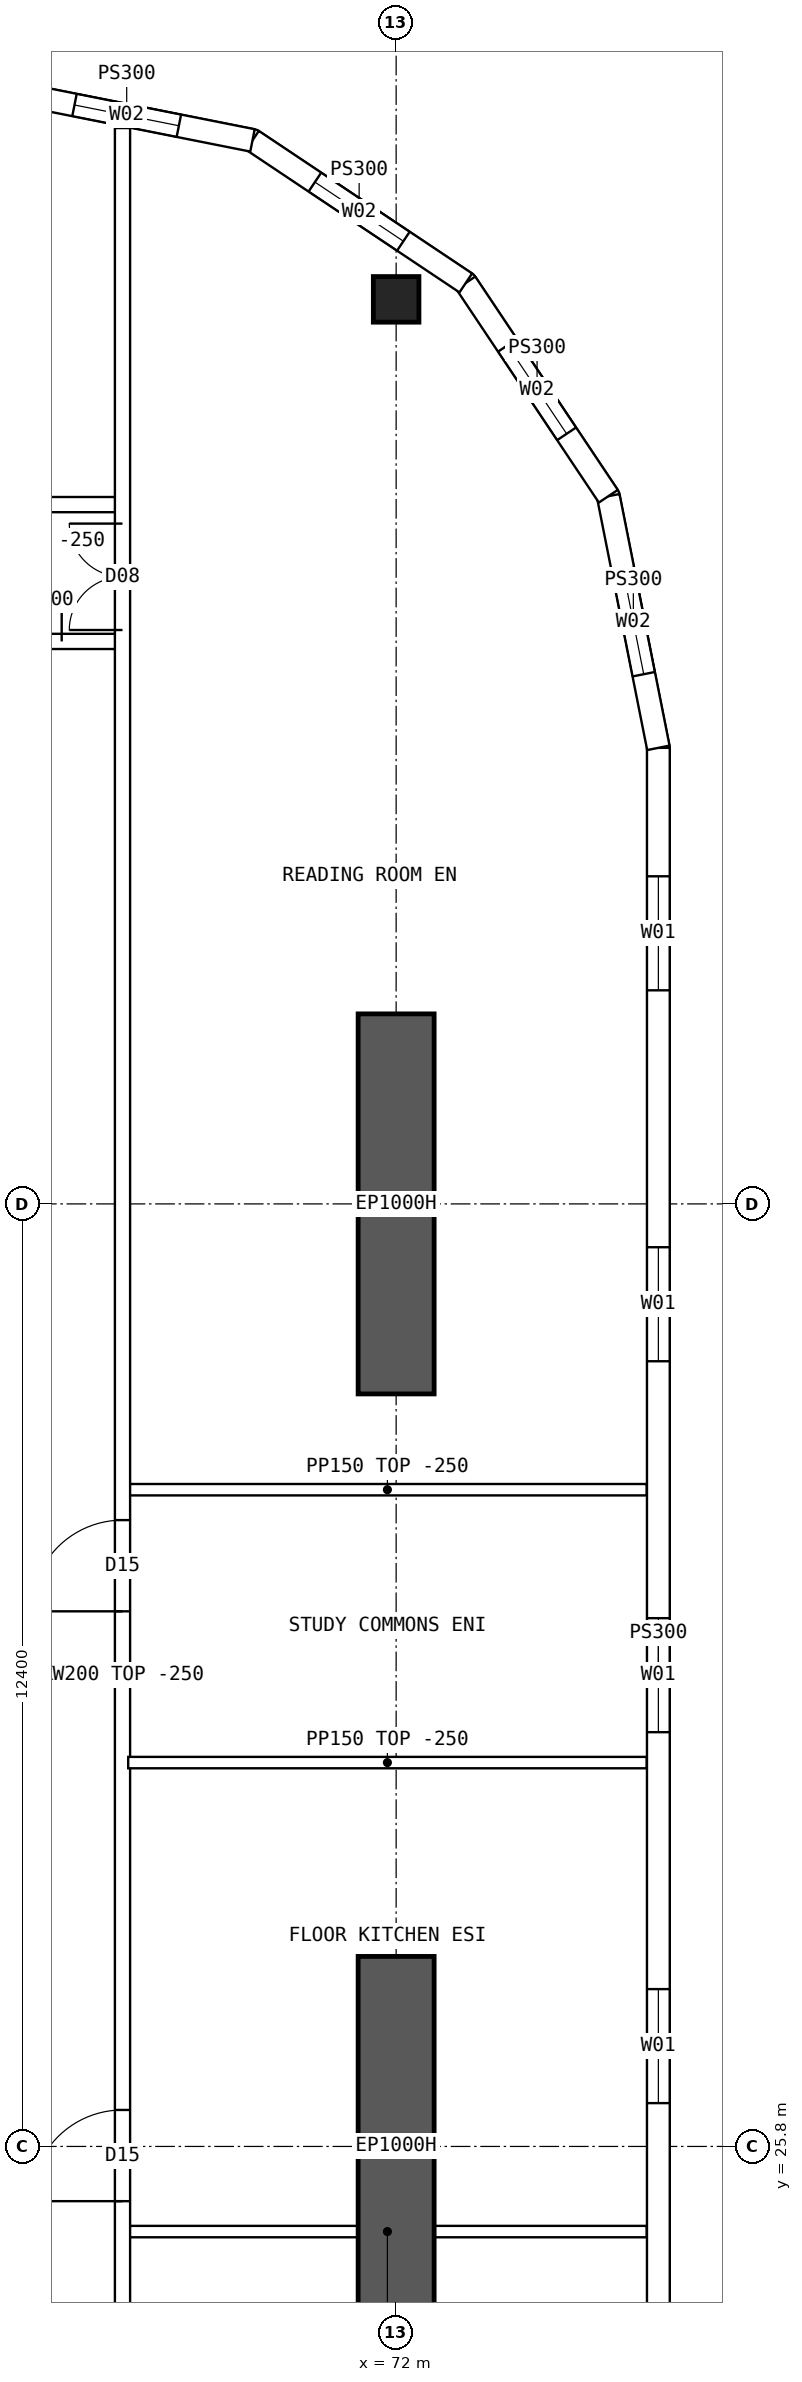
"""IFC4 building model, lengths in metres.
Left out: names, types, materials, properties, quantities, classifications, styles, units other than length and angle.
Written with IfcOpenShell. Run it as: python <this file> out.ifc"""

import sys

from ifc_helpers import new_model, si_unit, direction, frame, frame_2d, origin, origin_2d, place, context, subcontext, project, spatial, polyline, rectangle, hollow_rectangle, outline, extrude, element, fill, save


model = new_model("IFC4")
c1 = context("Model", 3, precision=1e-05, world=origin(), true_north=direction((0.0, 1.0)))
c2 = subcontext(c1, "Body", "Model", "MODEL_VIEW")
j1 = project(units=[si_unit("LENGTHUNIT", "METRE"), si_unit("PLANEANGLEUNIT", "RADIAN")], contexts=[c1])
p1 = place(None, origin())
s1 = spatial("IfcSite", under=j1, at=p1, CompositionType="ELEMENT")
p2 = place(p1, origin())
s2 = spatial("IfcBuilding", under=s1, at=p2, CompositionType="ELEMENT")
p3 = place(p2, frame((0.0, 0.0, 231.55)))
s3 = spatial("IfcBuildingStorey", under=s2, at=p3, CompositionType="ELEMENT", Elevation=231.55)
p4 = place(p3, frame((72.0, 50.1, 0.0), z_axis=(0.0, 0.0, 1.0), x_axis=(1.0, 0.0, 0.0)))
e1 = element("IfcColumn", 1, at=p4, inside=s3, PredefinedType="COLUMN", context=c2, shape_type="SweptSolid", body=[
    extrude(hollow_rectangle(XDim=0.6, YDim=0.6, WallThickness=0.06, at=origin_2d()), origin(), (0.0, 0.0, 1.0), 3.75),
])
for number, where, z_axis, x_axis in (
    (2, (72.0, 23.3, 0.0), (0.0, 0.0, 1.0), (0.0, 1.0, 0.0)),
    (3, (72.0, 35.7, 0.0), (0.0, 0.0, 1.0), (0.0, 1.0, 0.0)),
):
    element("IfcWall", number, at=place(p3, frame(where, z_axis=z_axis, x_axis=x_axis)), inside=s3, PredefinedType="SHEAR", context=c2, shape_type="SweptSolid", body=[
        extrude(rectangle(XDim=5.0, YDim=1.0, at=frame_2d((2.5, 0.0))), origin(), (0.0, 0.0, 1.0), 3.75),
    ])
p5 = place(p3, frame((75.45, 19.8, 0.0), z_axis=(0.0, 0.0, 1.0), x_axis=(0.0, 1.0, 0.0)))
e4 = element("IfcWall", 4, at=p5, inside=s3, PredefinedType="SOLIDWALL", context=c2, shape_type="SweptSolid", body=[
    extrude(outline(polyline([(-0.015, -0.15), (24.415, -0.15), (24.385, 0.15), (0.015, 0.15), (-0.015, -0.15)])), origin(), (0.0, 0.0, 1.0), 3.5),
])
p6 = place(p5, frame((1.69, 0.0, 0.9)))
e5 = element("IfcOpeningElement", 5, at=p6, cuts=e4, PredefinedType="OPENING", context=c2, shape_type="SweptSolid", body=[
    extrude(rectangle(XDim=1.5, YDim=2.0, at=frame_2d((0.75, 1.0))), frame((0.0, 0.16, 0.0), z_axis=(0.0, -1.0, 0.0), x_axis=(1.0, 0.0, 0.0)), (0.0, 0.0, 1.0), 0.32),
])
p7 = place(p5, frame((6.57, 0.0, 0.9)))
e6 = element("IfcOpeningElement", 6, at=p7, cuts=e4, PredefinedType="OPENING", context=c2, shape_type="SweptSolid", body=[
    extrude(rectangle(XDim=1.5, YDim=2.0, at=frame_2d((0.75, 1.0))), frame((0.0, 0.16, 0.0), z_axis=(0.0, -1.0, 0.0), x_axis=(1.0, 0.0, 0.0)), (0.0, 0.0, 1.0), 0.32),
])
p8 = place(p5, frame((11.45, 0.0, 0.9)))
e7 = element("IfcOpeningElement", 7, at=p8, cuts=e4, PredefinedType="OPENING", context=c2, shape_type="SweptSolid", body=[
    extrude(rectangle(XDim=1.5, YDim=2.0, at=frame_2d((0.75, 1.0))), frame((0.0, 0.16, 0.0), z_axis=(0.0, -1.0, 0.0), x_axis=(1.0, 0.0, 0.0)), (0.0, 0.0, 1.0), 0.32),
])
p9 = place(p5, frame((16.33, 0.0, 0.9)))
e8 = element("IfcOpeningElement", 8, at=p9, cuts=e4, PredefinedType="OPENING", context=c2, shape_type="SweptSolid", body=[
    extrude(rectangle(XDim=1.5, YDim=2.0, at=frame_2d((0.75, 1.0))), frame((0.0, 0.16, 0.0), z_axis=(0.0, -1.0, 0.0), x_axis=(1.0, 0.0, 0.0)), (0.0, 0.0, 1.0), 0.32),
])
p10 = place(p5, frame((21.21, 0.0, 0.9)))
e9 = element("IfcOpeningElement", 9, at=p10, cuts=e4, PredefinedType="OPENING", context=c2, shape_type="SweptSolid", body=[
    extrude(rectangle(XDim=1.5, YDim=2.0, at=frame_2d((0.75, 1.0))), frame((0.0, 0.16, 0.0), z_axis=(0.0, -1.0, 0.0), x_axis=(1.0, 0.0, 0.0)), (0.0, 0.0, 1.0), 0.32),
])
p11 = place(p3, frame((75.45, 44.2, 0.0), z_axis=(0.0, 0.0, 1.0), x_axis=(-0.19508664885, 0.980786011034, 0.0)))
e10 = element("IfcWall", 10, at=p11, inside=s3, PredefinedType="SOLIDWALL", context=c2, shape_type="SweptSolid", body=[
    extrude(outline(polyline([(-0.015, -0.15), (3.405, -0.15), (3.345, 0.15), (0.015, 0.15), (-0.015, -0.15)])), origin(), (0.0, 0.0, 1.0), 3.5),
])
p12 = place(p11, frame((0.988, 0.0, 0.9)))
e11 = element("IfcOpeningElement", 11, at=p12, cuts=e10, PredefinedType="OPENING", context=c2, shape_type="SweptSolid", body=[
    extrude(rectangle(XDim=1.4, YDim=1.8, at=frame_2d((0.7, 0.9))), frame((0.0, 0.16, 0.0), z_axis=(0.0, -1.0, 0.0), x_axis=(1.0, 0.0, 0.0)), (0.0, 0.0, 1.0), 0.32),
])
p13 = place(p3, frame((74.792, 47.51, 0.0), z_axis=(0.0, 0.0, 1.0), x_axis=(-0.555567969291, 0.831471124873, 0.0)))
e12 = element("IfcWall", 12, at=p13, inside=s3, PredefinedType="SOLIDWALL", context=c2, shape_type="SweptSolid", body=[
    extrude(outline(polyline([(-0.03, -0.15), (3.405, -0.15), (3.345, 0.15), (0.03, 0.15), (-0.03, -0.15)])), origin(), (0.0, 0.0, 1.0), 3.5),
])
p14 = place(p13, frame((0.988, 0.0, 0.9)))
e13 = element("IfcOpeningElement", 13, at=p14, cuts=e12, PredefinedType="OPENING", context=c2, shape_type="SweptSolid", body=[
    extrude(rectangle(XDim=1.4, YDim=1.8, at=frame_2d((0.7, 0.9))), frame((0.0, 0.16, 0.0), z_axis=(0.0, -1.0, 0.0), x_axis=(1.0, 0.0, 0.0)), (0.0, 0.0, 1.0), 0.32),
])
p15 = place(p3, frame((72.917, 50.316, 0.0), z_axis=(0.0, 0.0, 1.0), x_axis=(-0.831460037396, 0.555584562613, 0.0)))
e14 = element("IfcWall", 14, at=p15, inside=s3, PredefinedType="SOLIDWALL", context=c2, shape_type="SweptSolid", body=[
    extrude(outline(polyline([(-0.03, -0.15), (3.405, -0.15), (3.345, 0.15), (0.03, 0.15), (-0.03, -0.15)])), origin(), (0.0, 0.0, 1.0), 3.5),
])
p16 = place(p15, frame((0.988, 0.0, 0.9)))
e15 = element("IfcOpeningElement", 15, at=p16, cuts=e14, PredefinedType="OPENING", context=c2, shape_type="SweptSolid", body=[
    extrude(rectangle(XDim=1.4, YDim=1.8, at=frame_2d((0.7, 0.9))), frame((0.0, 0.16, 0.0), z_axis=(0.0, -1.0, 0.0), x_axis=(1.0, 0.0, 0.0)), (0.0, 0.0, 1.0), 0.32),
])
p17 = place(p3, frame((70.11, 52.192, 0.0), z_axis=(0.0, 0.0, 1.0), x_axis=(-0.98078325777, 0.195100490205, 0.0)))
e16 = element("IfcWall", 16, at=p17, inside=s3, PredefinedType="SOLIDWALL", context=c2, shape_type="SweptSolid", body=[
    extrude(outline(polyline([(-0.03, -0.15), (3.405, -0.15), (3.345, 0.15), (0.03, 0.15), (-0.03, -0.15)])), origin(), (0.0, 0.0, 1.0), 3.5),
])
p18 = place(p17, frame((0.988, 0.0, 0.9)))
e17 = element("IfcOpeningElement", 17, at=p18, cuts=e16, PredefinedType="OPENING", context=c2, shape_type="SweptSolid", body=[
    extrude(rectangle(XDim=1.4, YDim=1.8, at=frame_2d((0.7, 0.9))), frame((0.0, 0.16, 0.0), z_axis=(0.0, -1.0, 0.0), x_axis=(1.0, 0.0, 0.0)), (0.0, 0.0, 1.0), 0.32),
])
p19 = place(p3, frame((66.35, 47.4, 0.0), z_axis=(0.0, 0.0, 1.0), x_axis=(1.0, 0.0, 0.0)))
e18 = element("IfcWall", 18, at=p19, inside=s3, PredefinedType="SOLIDWALL", context=c2, shape_type="SweptSolid", body=[
    extrude(rectangle(XDim=2.05, YDim=0.2, at=frame_2d((1.025, 0.0))), origin(), (0.0, 0.0, 1.0), 3.5),
])
p20 = place(p19, frame((0.2, 0.0, 0.0)))
e19 = element("IfcOpeningElement", 19, at=p20, cuts=e18, PredefinedType="OPENING", context=c2, shape_type="SweptSolid", body=[
    extrude(rectangle(XDim=0.9, YDim=2.1, at=frame_2d((0.45, 1.05))), frame((0.0, 0.11, 0.0), z_axis=(0.0, -1.0, 0.0), x_axis=(1.0, 0.0, 0.0)), (0.0, 0.0, 1.0), 0.22),
])
p21 = place(p3, frame((66.35, 45.6, 0.0), z_axis=(0.0, 0.0, 1.0), x_axis=(1.0, 0.0, 0.0)))
e20 = element("IfcWall", 20, at=p21, inside=s3, PredefinedType="SOLIDWALL", context=c2, shape_type="SweptSolid", body=[
    extrude(rectangle(XDim=2.05, YDim=0.2, at=frame_2d((1.025, 0.0))), origin(), (0.0, 0.0, 1.0), 3.5),
])
p22 = place(p21, frame((0.05, 0.0, 0.0)))
e21 = element("IfcOpeningElement", 21, at=p22, cuts=e20, PredefinedType="OPENING", context=c2, shape_type="SweptSolid", body=[
    extrude(rectangle(XDim=1.2, YDim=2.1, at=frame_2d((0.6, 1.05))), frame((0.0, 0.11, 0.0), z_axis=(0.0, -1.0, 0.0), x_axis=(1.0, 0.0, 0.0)), (0.0, 0.0, 1.0), 0.22),
])
p23 = place(p3, frame((68.475, 30.85, 0.0), z_axis=(0.0, 0.0, 1.0), x_axis=(1.0, 0.0, 0.0)))
e22 = element("IfcWall", 22, at=p23, inside=s3, PredefinedType="PARTITIONING", context=c2, shape_type="SweptSolid", body=[
    extrude(outline(polyline([(0.0, 0.0), (6.82, 0.0), (6.82, 3.5), (3.827, 3.5), (3.825, 3.05), (3.227, 3.05), (3.225, 3.5), (0.0, 3.5), (0.0, 0.0)])), frame((0.0, 0.075, 0.0), z_axis=(0.0, -1.0, 0.0), x_axis=(1.0, 0.0, 0.0)), (0.0, 0.0, 1.0), 0.15),
])
p24 = place(p3, frame((68.4, 11.646, 0.0), z_axis=(0.0, 0.0, 1.0), x_axis=(0.0, 1.0, 0.0)))
e23 = element("IfcWall", 23, at=p24, inside=s3, PredefinedType="SOLIDWALL", context=c2, shape_type="SweptSolid", body=[
    extrude(rectangle(XDim=40.708, YDim=0.2, at=frame_2d((20.354, 0.0))), origin(), (0.0, 0.0, 1.0), 3.5),
])
p25 = place(p24, frame((13.434, 0.0, 0.0)))
e24 = element("IfcOpeningElement", 24, at=p25, cuts=e23, PredefinedType="OPENING", context=c2, shape_type="SweptSolid", body=[
    extrude(rectangle(XDim=1.2, YDim=2.1, at=frame_2d((0.6, 1.05))), frame((0.0, 0.11, 0.0), z_axis=(0.0, -1.0, 0.0), x_axis=(1.0, 0.0, 0.0)), (0.0, 0.0, 1.0), 0.22),
])
p26 = place(p24, frame((21.194, 0.0, 0.0)))
e25 = element("IfcOpeningElement", 25, at=p26, cuts=e23, PredefinedType="OPENING", context=c2, shape_type="SweptSolid", body=[
    extrude(rectangle(XDim=1.2, YDim=2.1, at=frame_2d((0.6, 1.05))), frame((0.0, 0.11, 0.0), z_axis=(0.0, -1.0, 0.0), x_axis=(1.0, 0.0, 0.0)), (0.0, 0.0, 1.0), 0.22),
])
p27 = place(p24, frame((5.104, 0.0, 0.0)))
e26 = element("IfcOpeningElement", 26, at=p27, cuts=e23, PredefinedType="OPENING", context=c2, shape_type="SweptSolid", body=[
    extrude(rectangle(XDim=1.4, YDim=2.1, at=frame_2d((0.7, 1.05))), frame((0.0, 0.11, 0.0), z_axis=(0.0, -1.0, 0.0), x_axis=(1.0, 0.0, 0.0)), (0.0, 0.0, 1.0), 0.22),
])
p28 = place(p24, frame((34.104, 0.0, 0.0)))
e27 = element("IfcOpeningElement", 27, at=p28, cuts=e23, PredefinedType="OPENING", context=c2, shape_type="SweptSolid", body=[
    extrude(rectangle(XDim=1.4, YDim=2.1, at=frame_2d((0.7, 1.05))), frame((0.0, 0.11, 0.0), z_axis=(0.0, -1.0, 0.0), x_axis=(1.0, 0.0, 0.0)), (0.0, 0.0, 1.0), 0.22),
])
p29 = place(p3, frame((68.475, 24.68, 0.0), z_axis=(0.0, 0.0, 1.0), x_axis=(1.0, 0.0, 0.0)))
e28 = element("IfcWall", 28, at=p29, inside=s3, PredefinedType="PARTITIONING", context=c2, shape_type="SweptSolid", body=[
    extrude(rectangle(XDim=6.82, YDim=0.15, at=frame_2d((3.41, 0.0))), origin(), (0.0, 0.0, 1.0), 3.5),
])
p30 = place(p3, frame((68.475, 34.44, 0.0), z_axis=(0.0, 0.0, 1.0), x_axis=(1.0, 0.0, 0.0)))
e29 = element("IfcWall", 29, at=p30, inside=s3, PredefinedType="PARTITIONING", context=c2, shape_type="SweptSolid", body=[
    extrude(outline(polyline([(0.0, 0.0), (6.82, 0.0), (6.82, 3.5), (3.827, 3.5), (3.825, 3.05), (3.227, 3.05), (3.225, 3.5), (0.0, 3.5), (0.0, 0.0)])), frame((0.0, 0.075, 0.0), z_axis=(0.0, -1.0, 0.0), x_axis=(1.0, 0.0, 0.0)), (0.0, 0.0, 1.0), 0.15),
])
p31 = place(p7, origin())
e30 = element("IfcWindow", 30, at=p31, inside=s3, PartitioningType="SINGLE_PANEL", PredefinedType="WINDOW", context=c2, shape_type="SweptSolid", body=[
    extrude(rectangle(XDim=1.5, YDim=2.0, at=frame_2d((0.75, 1.0))), frame((0.0, 0.03, 0.0), z_axis=(0.0, -1.0, 0.0), x_axis=(1.0, 0.0, 0.0)), (0.0, 0.0, 1.0), 0.06),
])
fill(e6, e30)
p32 = place(p8, origin())
e31 = element("IfcWindow", 31, at=p32, inside=s3, PartitioningType="SINGLE_PANEL", PredefinedType="WINDOW", context=c2, shape_type="SweptSolid", body=[
    extrude(rectangle(XDim=1.5, YDim=2.0, at=frame_2d((0.75, 1.0))), frame((0.0, 0.03, 0.0), z_axis=(0.0, -1.0, 0.0), x_axis=(1.0, 0.0, 0.0)), (0.0, 0.0, 1.0), 0.06),
])
fill(e7, e31)
p33 = place(p9, origin())
e32 = element("IfcWindow", 32, at=p33, inside=s3, PartitioningType="SINGLE_PANEL", PredefinedType="WINDOW", context=c2, shape_type="SweptSolid", body=[
    extrude(rectangle(XDim=1.5, YDim=2.0, at=frame_2d((0.75, 1.0))), frame((0.0, 0.03, 0.0), z_axis=(0.0, -1.0, 0.0), x_axis=(1.0, 0.0, 0.0)), (0.0, 0.0, 1.0), 0.06),
])
fill(e8, e32)
p34 = place(p10, origin())
e33 = element("IfcWindow", 33, at=p34, inside=s3, PartitioningType="SINGLE_PANEL", PredefinedType="WINDOW", context=c2, shape_type="SweptSolid", body=[
    extrude(rectangle(XDim=1.5, YDim=2.0, at=frame_2d((0.75, 1.0))), frame((0.0, 0.03, 0.0), z_axis=(0.0, -1.0, 0.0), x_axis=(1.0, 0.0, 0.0)), (0.0, 0.0, 1.0), 0.06),
])
fill(e9, e33)
p35 = place(p12, origin())
e34 = element("IfcWindow", 34, at=p35, inside=s3, PartitioningType="SINGLE_PANEL", PredefinedType="WINDOW", context=c2, shape_type="SweptSolid", body=[
    extrude(rectangle(XDim=1.4, YDim=1.8, at=frame_2d((0.7, 0.9))), frame((0.0, 0.03, 0.0), z_axis=(0.0, -1.0, 0.0), x_axis=(1.0, 0.0, 0.0)), (0.0, 0.0, 1.0), 0.06),
])
fill(e11, e34)
p36 = place(p14, origin())
e35 = element("IfcWindow", 35, at=p36, inside=s3, PartitioningType="SINGLE_PANEL", PredefinedType="WINDOW", context=c2, shape_type="SweptSolid", body=[
    extrude(rectangle(XDim=1.4, YDim=1.8, at=frame_2d((0.7, 0.9))), frame((0.0, 0.03, 0.0), z_axis=(0.0, -1.0, 0.0), x_axis=(1.0, 0.0, 0.0)), (0.0, 0.0, 1.0), 0.06),
])
fill(e13, e35)
p37 = place(p16, origin())
e36 = element("IfcWindow", 36, at=p37, inside=s3, PartitioningType="SINGLE_PANEL", PredefinedType="WINDOW", context=c2, shape_type="SweptSolid", body=[
    extrude(rectangle(XDim=1.4, YDim=1.8, at=frame_2d((0.7, 0.9))), frame((0.0, 0.03, 0.0), z_axis=(0.0, -1.0, 0.0), x_axis=(1.0, 0.0, 0.0)), (0.0, 0.0, 1.0), 0.06),
])
fill(e15, e36)
p38 = place(p18, origin())
e37 = element("IfcWindow", 37, at=p38, inside=s3, PartitioningType="SINGLE_PANEL", PredefinedType="WINDOW", context=c2, shape_type="SweptSolid", body=[
    extrude(rectangle(XDim=1.4, YDim=1.8, at=frame_2d((0.7, 0.9))), frame((0.0, 0.03, 0.0), z_axis=(0.0, -1.0, 0.0), x_axis=(1.0, 0.0, 0.0)), (0.0, 0.0, 1.0), 0.06),
])
fill(e17, e37)
p39 = place(p22, origin())
e38 = element("IfcDoor", 38, at=p39, inside=s3, OperationType="DOUBLE_DOOR_SINGLE_SWING", PredefinedType="DOOR", context=c2, shape_type="SweptSolid", body=[
    extrude(rectangle(XDim=1.2, YDim=2.1, at=frame_2d((0.6, 1.05))), frame((0.0, 0.025, 0.0), z_axis=(0.0, -1.0, 0.0), x_axis=(1.0, 0.0, 0.0)), (0.0, 0.0, 1.0), 0.05),
])
fill(e21, e38)
p40 = place(p25, origin())
e39 = element("IfcDoor", 39, at=p40, inside=s3, OperationType="SINGLE_SWING_LEFT", PredefinedType="DOOR", context=c2, shape_type="SweptSolid", body=[
    extrude(rectangle(XDim=1.2, YDim=2.1, at=frame_2d((0.6, 1.05))), frame((0.0, 0.025, 0.0), z_axis=(0.0, -1.0, 0.0), x_axis=(1.0, 0.0, 0.0)), (0.0, 0.0, 1.0), 0.05),
])
fill(e24, e39)
p41 = place(p26, origin())
e40 = element("IfcDoor", 40, at=p41, inside=s3, OperationType="SINGLE_SWING_LEFT", PredefinedType="DOOR", context=c2, shape_type="SweptSolid", body=[
    extrude(rectangle(XDim=1.2, YDim=2.1, at=frame_2d((0.6, 1.05))), frame((0.0, 0.025, 0.0), z_axis=(0.0, -1.0, 0.0), x_axis=(1.0, 0.0, 0.0)), (0.0, 0.0, 1.0), 0.05),
])
fill(e25, e40)
p42 = place(p28, origin())
e41 = element("IfcDoor", 41, at=p42, inside=s3, OperationType="DOUBLE_DOOR_SINGLE_SWING", PredefinedType="DOOR", context=c2, shape_type="SweptSolid", body=[
    extrude(rectangle(XDim=1.4, YDim=2.1, at=frame_2d((0.7, 1.05))), frame((0.0, 0.025, 0.0), z_axis=(0.0, -1.0, 0.0), x_axis=(1.0, 0.0, 0.0)), (0.0, 0.0, 1.0), 0.05),
])
fill(e27, e41)
save(model, sys.argv[1])
